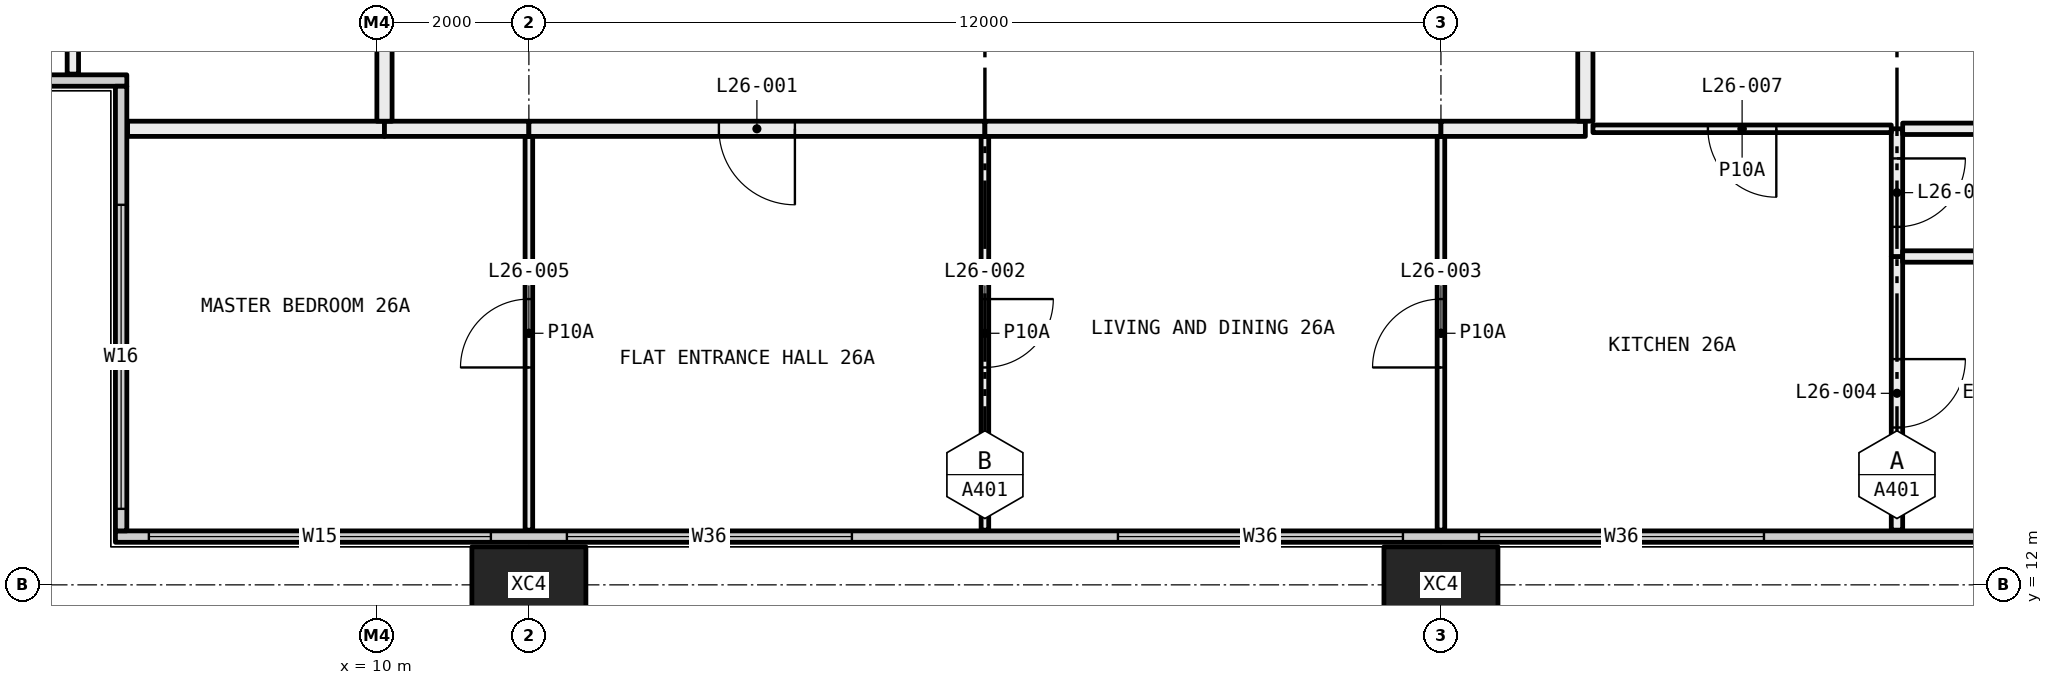
"""IFC4 building model, lengths in metres.
Left out: names, types, materials, properties, quantities, classifications, styles, units other than length and angle.
Written with IfcOpenShell. Run it as: python <this file> out.ifc"""

import sys

from ifc_helpers import new_model, si_unit, direction, frame, frame_2d, origin, origin_2d, place, context, subcontext, project, spatial, rectangle, hollow_rectangle, extrude, element, fill, save


model = new_model("IFC4")
c1 = context("Model", 3, precision=1e-05, world=origin(), true_north=direction((0.0, 1.0)))
c2 = subcontext(c1, "Body", "Model", "MODEL_VIEW")
j1 = project(units=[si_unit("LENGTHUNIT", "METRE"), si_unit("PLANEANGLEUNIT", "RADIAN")], contexts=[c1])
p1 = place(None, origin())
s1 = spatial("IfcSite", under=j1, at=p1, CompositionType="ELEMENT")
p2 = place(p1, origin())
s2 = spatial("IfcBuilding", under=s1, at=p2, CompositionType="ELEMENT")
p3 = place(p2, frame((0.0, 0.0, 103.5)))
s3 = spatial("IfcBuildingStorey", under=s2, at=p3, CompositionType="ELEMENT", Elevation=103.5)
for number, where, z_axis, x_axis in (
    (1, (12.0, 12.0, -0.4), (0.0, 0.0, 1.0), (1.0, 0.0, 0.0)),
    (2, (24.0, 12.0, -0.4), (0.0, 0.0, 1.0), (1.0, 0.0, 0.0)),
):
    element("IfcColumn", number, at=place(p3, frame(where, z_axis=z_axis, x_axis=x_axis)), inside=s3, PredefinedType="COLUMN", context=c2, shape_type="SweptSolid", body=[
        extrude(hollow_rectangle(XDim=1.5, YDim=1.0, WallThickness=0.06, at=origin_2d()), origin(), (0.0, 0.0, 1.0), 3.45),
    ])
p4 = place(p3, frame((6.56, 12.635, 0.0), z_axis=(0.0, 0.0, 1.0), x_axis=(1.0, 0.0, 0.0)))
e3 = element("IfcWall", 3, at=p4, inside=s3, PredefinedType="ELEMENTEDWALL", context=c2, shape_type="SweptSolid", body=[
    extrude(rectangle(XDim=58.88, YDim=0.15, at=frame_2d((29.44, 0.0))), origin(), (0.0, 0.0, 1.0), 3.05),
])
p5 = place(p4, frame((0.44, 0.0, 0.45)))
e4 = element("IfcOpeningElement", 4, at=p5, cuts=e3, PredefinedType="OPENING", context=c2, shape_type="SweptSolid", body=[
    extrude(rectangle(XDim=4.5, YDim=2.55, at=frame_2d((2.25, 1.275))), frame((0.0, 0.085, 0.0), z_axis=(0.0, -1.0, 0.0), x_axis=(1.0, 0.0, 0.0)), (0.0, 0.0, 1.0), 0.17),
])
p6 = place(p4, frame((5.94, 0.0, 0.45)))
e5 = element("IfcOpeningElement", 5, at=p6, cuts=e3, PredefinedType="OPENING", context=c2, shape_type="SweptSolid", body=[
    extrude(rectangle(XDim=3.75, YDim=2.55, at=frame_2d((1.875, 1.275))), frame((0.0, 0.085, 0.0), z_axis=(0.0, -1.0, 0.0), x_axis=(1.0, 0.0, 0.0)), (0.0, 0.0, 1.0), 0.17),
])
p7 = place(p4, frame((13.19, 0.0, 0.45)))
e6 = element("IfcOpeningElement", 6, at=p7, cuts=e3, PredefinedType="OPENING", context=c2, shape_type="SweptSolid", body=[
    extrude(rectangle(XDim=3.75, YDim=2.55, at=frame_2d((1.875, 1.275))), frame((0.0, 0.085, 0.0), z_axis=(0.0, -1.0, 0.0), x_axis=(1.0, 0.0, 0.0)), (0.0, 0.0, 1.0), 0.17),
])
p8 = place(p4, frame((17.94, 0.0, 0.45)))
e7 = element("IfcOpeningElement", 7, at=p8, cuts=e3, PredefinedType="OPENING", context=c2, shape_type="SweptSolid", body=[
    extrude(rectangle(XDim=3.75, YDim=2.55, at=frame_2d((1.875, 1.275))), frame((0.0, 0.085, 0.0), z_axis=(0.0, -1.0, 0.0), x_axis=(1.0, 0.0, 0.0)), (0.0, 0.0, 1.0), 0.17),
])
p9 = place(p4, frame((25.19, 0.0, 0.45)))
e8 = element("IfcOpeningElement", 8, at=p9, cuts=e3, PredefinedType="OPENING", context=c2, shape_type="SweptSolid", body=[
    extrude(rectangle(XDim=0.75, YDim=2.55, at=frame_2d((0.375, 1.275))), frame((0.0, 0.085, 0.0), z_axis=(0.0, -1.0, 0.0), x_axis=(1.0, 0.0, 0.0)), (0.0, 0.0, 1.0), 0.17),
])
p10 = place(p4, frame((26.94, 0.0, 0.45)))
e9 = element("IfcOpeningElement", 9, at=p10, cuts=e3, PredefinedType="OPENING", context=c2, shape_type="SweptSolid", body=[
    extrude(rectangle(XDim=2.0, YDim=2.55, at=frame_2d((1.0, 1.275))), frame((0.0, 0.085, 0.0), z_axis=(0.0, -1.0, 0.0), x_axis=(1.0, 0.0, 0.0)), (0.0, 0.0, 1.0), 0.17),
])
p11 = place(p4, frame((29.94, 0.0, 0.45)))
e10 = element("IfcOpeningElement", 10, at=p11, cuts=e3, PredefinedType="OPENING", context=c2, shape_type="SweptSolid", body=[
    extrude(rectangle(XDim=3.75, YDim=2.55, at=frame_2d((1.875, 1.275))), frame((0.0, 0.085, 0.0), z_axis=(0.0, -1.0, 0.0), x_axis=(1.0, 0.0, 0.0)), (0.0, 0.0, 1.0), 0.17),
])
p12 = place(p4, frame((37.19, 0.0, 0.45)))
e11 = element("IfcOpeningElement", 11, at=p12, cuts=e3, PredefinedType="OPENING", context=c2, shape_type="SweptSolid", body=[
    extrude(rectangle(XDim=3.75, YDim=2.55, at=frame_2d((1.875, 1.275))), frame((0.0, 0.085, 0.0), z_axis=(0.0, -1.0, 0.0), x_axis=(1.0, 0.0, 0.0)), (0.0, 0.0, 1.0), 0.17),
])
p13 = place(p4, frame((41.94, 0.0, 0.45)))
e12 = element("IfcOpeningElement", 12, at=p13, cuts=e3, PredefinedType="OPENING", context=c2, shape_type="SweptSolid", body=[
    extrude(rectangle(XDim=3.75, YDim=2.55, at=frame_2d((1.875, 1.275))), frame((0.0, 0.085, 0.0), z_axis=(0.0, -1.0, 0.0), x_axis=(1.0, 0.0, 0.0)), (0.0, 0.0, 1.0), 0.17),
])
p14 = place(p4, frame((49.19, 0.0, 0.45)))
e13 = element("IfcOpeningElement", 13, at=p14, cuts=e3, PredefinedType="OPENING", context=c2, shape_type="SweptSolid", body=[
    extrude(rectangle(XDim=0.75, YDim=2.55, at=frame_2d((0.375, 1.275))), frame((0.0, 0.085, 0.0), z_axis=(0.0, -1.0, 0.0), x_axis=(1.0, 0.0, 0.0)), (0.0, 0.0, 1.0), 0.17),
])
p15 = place(p4, frame((50.94, 0.0, 0.45)))
e14 = element("IfcOpeningElement", 14, at=p15, cuts=e3, PredefinedType="OPENING", context=c2, shape_type="SweptSolid", body=[
    extrude(rectangle(XDim=2.0, YDim=2.55, at=frame_2d((1.0, 1.275))), frame((0.0, 0.085, 0.0), z_axis=(0.0, -1.0, 0.0), x_axis=(1.0, 0.0, 0.0)), (0.0, 0.0, 1.0), 0.17),
])
p16 = place(p4, frame((53.94, 0.0, 0.45)))
e15 = element("IfcOpeningElement", 15, at=p16, cuts=e3, PredefinedType="OPENING", context=c2, shape_type="SweptSolid", body=[
    extrude(rectangle(XDim=4.5, YDim=2.55, at=frame_2d((2.25, 1.275))), frame((0.0, 0.085, 0.0), z_axis=(0.0, -1.0, 0.0), x_axis=(1.0, 0.0, 0.0)), (0.0, 0.0, 1.0), 0.17),
])
p17 = place(p3, frame((0.56, 18.635, 0.0), z_axis=(0.0, 0.0, 1.0), x_axis=(1.0, 0.0, 0.0)))
e16 = element("IfcWall", 16, at=p17, inside=s3, PredefinedType="ELEMENTEDWALL", context=c2, shape_type="SweptSolid", body=[
    extrude(rectangle(XDim=6.15, YDim=0.15, at=frame_2d((3.075, 0.0))), origin(), (0.0, 0.0, 1.0), 3.05),
])
p18 = place(p17, frame((0.44, 0.0, 0.45)))
e17 = element("IfcOpeningElement", 17, at=p18, cuts=e16, PredefinedType="OPENING", context=c2, shape_type="SweptSolid", body=[
    extrude(rectangle(XDim=4.0, YDim=2.55, at=frame_2d((2.0, 1.275))), frame((0.0, 0.085, 0.0), z_axis=(0.0, -1.0, 0.0), x_axis=(1.0, 0.0, 0.0)), (0.0, 0.0, 1.0), 0.17),
])
p19 = place(p3, frame((6.635, 12.71, 0.0), z_axis=(0.0, 0.0, 1.0), x_axis=(0.0, 1.0, 0.0)))
e18 = element("IfcWall", 18, at=p19, inside=s3, PredefinedType="ELEMENTEDWALL", context=c2, shape_type="SweptSolid", body=[
    extrude(rectangle(XDim=5.85, YDim=0.15, at=frame_2d((2.925, 0.0))), origin(), (0.0, 0.0, 1.0), 3.05),
])
p20 = place(p19, frame((0.29, 0.0, 0.45)))
e19 = element("IfcOpeningElement", 19, at=p20, cuts=e18, PredefinedType="OPENING", context=c2, shape_type="SweptSolid", body=[
    extrude(rectangle(XDim=4.0, YDim=2.55, at=frame_2d((2.0, 1.275))), frame((0.0, 0.085, 0.0), z_axis=(0.0, -1.0, 0.0), x_axis=(1.0, 0.0, 0.0)), (0.0, 0.0, 1.0), 0.17),
])
p21 = place(p3, frame((12.0, 12.72, 0.0), z_axis=(0.0, 0.0, 1.0), x_axis=(0.0, 1.0, 0.0)))
e20 = element("IfcWall", 20, at=p21, inside=s3, PredefinedType="PARTITIONING", context=c2, shape_type="SweptSolid", body=[
    extrude(rectangle(XDim=5.18, YDim=0.1, at=frame_2d((2.59, 0.0))), origin(), (0.0, 0.0, 1.0), 3.05),
])
p22 = place(p21, frame((2.14, 0.0, 0.0)))
e21 = element("IfcOpeningElement", 21, at=p22, cuts=e20, PredefinedType="OPENING", context=c2, shape_type="SweptSolid", body=[
    extrude(rectangle(XDim=0.9, YDim=2.1, at=frame_2d((0.45, 1.05))), frame((0.0, 0.06, 0.0), z_axis=(0.0, -1.0, 0.0), x_axis=(1.0, 0.0, 0.0)), (0.0, 0.0, 1.0), 0.12),
])
p23 = place(p3, frame((10.1, 18.0, 0.0), z_axis=(0.0, 0.0, 1.0), x_axis=(-1.0, 0.0, 0.0)))
e22 = element("IfcWall", 22, at=p23, inside=s3, PredefinedType="PARTITIONING", context=c2, shape_type="SweptSolid", body=[
    extrude(rectangle(XDim=3.38, YDim=0.2, at=frame_2d((1.69, 0.0))), origin(), (0.0, 0.0, 1.0), 3.05),
])
p24 = place(p3, frame((12.0, 18.0, 0.0), z_axis=(0.0, 0.0, 1.0), x_axis=(-1.0, 0.0, 0.0)))
e23 = element("IfcWall", 23, at=p24, inside=s3, PredefinedType="PARTITIONING", context=c2, shape_type="SweptSolid", body=[
    extrude(rectangle(XDim=1.9, YDim=0.2, at=frame_2d((0.95, 0.0))), origin(), (0.0, 0.0, 1.0), 3.05),
])
p25 = place(p3, frame((18.0, 12.72, 0.0), z_axis=(0.0, 0.0, 1.0), x_axis=(0.0, 1.0, 0.0)))
e24 = element("IfcWall", 24, at=p25, inside=s3, PredefinedType="PARTITIONING", context=c2, shape_type="SweptSolid", body=[
    extrude(rectangle(XDim=5.18, YDim=0.1, at=frame_2d((2.59, 0.0))), origin(), (0.0, 0.0, 1.0), 3.05),
])
p26 = place(p25, frame((2.14, 0.0, 0.0)))
e25 = element("IfcOpeningElement", 25, at=p26, cuts=e24, PredefinedType="OPENING", context=c2, shape_type="SweptSolid", body=[
    extrude(rectangle(XDim=0.9, YDim=2.1, at=frame_2d((0.45, 1.05))), frame((0.0, 0.06, 0.0), z_axis=(0.0, -1.0, 0.0), x_axis=(1.0, 0.0, 0.0)), (0.0, 0.0, 1.0), 0.12),
])
p27 = place(p3, frame((18.0, 18.0, 0.0), z_axis=(0.0, 0.0, 1.0), x_axis=(-1.0, 0.0, 0.0)))
e26 = element("IfcWall", 26, at=p27, inside=s3, PredefinedType="PARTITIONING", context=c2, shape_type="SweptSolid", body=[
    extrude(rectangle(XDim=6.0, YDim=0.2, at=frame_2d((3.0, 0.0))), origin(), (0.0, 0.0, 1.0), 3.05),
])
p28 = place(p27, frame((2.5, 0.0, 0.0)))
e27 = element("IfcOpeningElement", 27, at=p28, cuts=e26, PredefinedType="OPENING", context=c2, shape_type="SweptSolid", body=[
    extrude(rectangle(XDim=1.0, YDim=2.1, at=frame_2d((0.5, 1.05))), frame((0.0, 0.11, 0.0), z_axis=(0.0, -1.0, 0.0), x_axis=(1.0, 0.0, 0.0)), (0.0, 0.0, 1.0), 0.22),
])
p29 = place(p3, frame((24.0, 12.72, 0.0), z_axis=(0.0, 0.0, 1.0), x_axis=(0.0, 1.0, 0.0)))
e28 = element("IfcWall", 28, at=p29, inside=s3, PredefinedType="PARTITIONING", context=c2, shape_type="SweptSolid", body=[
    extrude(rectangle(XDim=5.18, YDim=0.1, at=frame_2d((2.59, 0.0))), origin(), (0.0, 0.0, 1.0), 3.05),
])
p30 = place(p29, frame((2.14, 0.0, 0.0)))
e29 = element("IfcOpeningElement", 29, at=p30, cuts=e28, PredefinedType="OPENING", context=c2, shape_type="SweptSolid", body=[
    extrude(rectangle(XDim=0.9, YDim=2.1, at=frame_2d((0.45, 1.05))), frame((0.0, 0.06, 0.0), z_axis=(0.0, -1.0, 0.0), x_axis=(1.0, 0.0, 0.0)), (0.0, 0.0, 1.0), 0.12),
])
p31 = place(p3, frame((24.0, 18.0, 0.0), z_axis=(0.0, 0.0, 1.0), x_axis=(-1.0, 0.0, 0.0)))
e30 = element("IfcWall", 30, at=p31, inside=s3, PredefinedType="PARTITIONING", context=c2, shape_type="SweptSolid", body=[
    extrude(rectangle(XDim=6.0, YDim=0.2, at=frame_2d((3.0, 0.0))), origin(), (0.0, 0.0, 1.0), 3.05),
])
p32 = place(p3, frame((30.0, 12.72, 0.0), z_axis=(0.0, 0.0, 1.0), x_axis=(0.0, 1.0, 0.0)))
e31 = element("IfcWall", 31, at=p32, inside=s3, PredefinedType="PARTITIONING", context=c2, shape_type="SweptSolid", body=[
    extrude(rectangle(XDim=3.6, YDim=0.15, at=frame_2d((1.8, 0.0))), origin(), (0.0, 0.0, 1.0), 3.05),
])
p33 = place(p32, frame((1.35, 0.0, 0.0)))
e32 = element("IfcOpeningElement", 32, at=p33, cuts=e31, PredefinedType="OPENING", context=c2, shape_type="SweptSolid", body=[
    extrude(rectangle(XDim=0.9, YDim=2.1, at=frame_2d((0.45, 1.05))), frame((0.0, 0.085, 0.0), z_axis=(0.0, -1.0, 0.0), x_axis=(1.0, 0.0, 0.0)), (0.0, 0.0, 1.0), 0.17),
])
p34 = place(p3, frame((30.0, 16.32, 0.0), z_axis=(0.0, 0.0, 1.0), x_axis=(0.0, 1.0, 0.0)))
e33 = element("IfcWall", 33, at=p34, inside=s3, PredefinedType="PARTITIONING", context=c2, shape_type="SweptSolid", body=[
    extrude(rectangle(XDim=1.68, YDim=0.15, at=frame_2d((0.84, 0.0))), origin(), (0.0, 0.0, 1.0), 3.05),
])
p35 = place(p34, frame((0.39, 0.0, 0.0)))
e34 = element("IfcOpeningElement", 34, at=p35, cuts=e33, PredefinedType="OPENING", context=c2, shape_type="SweptSolid", body=[
    extrude(rectangle(XDim=0.9, YDim=2.1, at=frame_2d((0.45, 1.05))), frame((0.0, 0.085, 0.0), z_axis=(0.0, -1.0, 0.0), x_axis=(1.0, 0.0, 0.0)), (0.0, 0.0, 1.0), 0.17),
])
p36 = place(p3, frame((29.925, 18.0, 0.0), z_axis=(0.0, 0.0, 1.0), x_axis=(-1.0, 0.0, 0.0)))
e35 = element("IfcWall", 35, at=p36, inside=s3, PredefinedType="PARTITIONING", context=c2, shape_type="SweptSolid", body=[
    extrude(rectangle(XDim=3.925, YDim=0.1, at=frame_2d((1.962, 0.0))), origin(), (0.0, 0.0, 1.0), 3.05),
])
p37 = place(p36, frame((1.512, 0.0, 0.0)))
e36 = element("IfcOpeningElement", 36, at=p37, cuts=e35, PredefinedType="OPENING", context=c2, shape_type="SweptSolid", body=[
    extrude(rectangle(XDim=0.9, YDim=2.1, at=frame_2d((0.45, 1.05))), frame((0.0, 0.06, 0.0), z_axis=(0.0, -1.0, 0.0), x_axis=(1.0, 0.0, 0.0)), (0.0, 0.0, 1.0), 0.12),
])
p38 = place(p3, frame((25.9, 18.0, 0.0), z_axis=(0.0, 0.0, 1.0), x_axis=(-1.0, 0.0, 0.0)))
e37 = element("IfcWall", 37, at=p38, inside=s3, PredefinedType="PARTITIONING", context=c2, shape_type="SweptSolid", body=[
    extrude(rectangle(XDim=1.9, YDim=0.2, at=frame_2d((0.95, 0.0))), origin(), (0.0, 0.0, 1.0), 3.05),
])
p39 = place(p3, frame((35.9, 16.32, 0.0), z_axis=(0.0, 0.0, 1.0), x_axis=(-1.0, 0.0, 0.0)))
e38 = element("IfcWall", 38, at=p39, inside=s3, PredefinedType="PARTITIONING", context=c2, shape_type="SweptSolid", body=[
    extrude(rectangle(XDim=5.825, YDim=0.15, at=frame_2d((2.913, 0.0))), origin(), (0.0, 0.0, 1.0), 3.05),
])
p40 = place(p3, frame((31.5, 18.0, 0.0), z_axis=(0.0, 0.0, 1.0), x_axis=(-1.0, 0.0, 0.0)))
e39 = element("IfcWall", 39, at=p40, inside=s3, PredefinedType="PARTITIONING", context=c2, shape_type="SweptSolid", body=[
    extrude(rectangle(XDim=1.425, YDim=0.15, at=frame_2d((0.712, 0.0))), origin(), (0.0, 0.0, 1.0), 3.05),
])
p41 = place(p3, frame((25.9, 23.9, 0.0), z_axis=(0.0, 0.0, 1.0), x_axis=(0.0, -1.0, 0.0)))
e40 = element("IfcWall", 40, at=p41, inside=s3, PredefinedType="PARTITIONING", context=c2, shape_type="SweptSolid", body=[
    extrude(rectangle(XDim=5.8, YDim=0.2, at=frame_2d((2.9, 0.0))), origin(), (0.0, 0.0, 1.0), 3.05),
])
p42 = place(p3, frame((6.0, 18.72, 0.0), z_axis=(0.0, 0.0, 1.0), x_axis=(0.0, 1.0, 0.0)))
e41 = element("IfcWall", 41, at=p42, inside=s3, PredefinedType="PARTITIONING", context=c2, shape_type="SweptSolid", body=[
    extrude(rectangle(XDim=3.78, YDim=0.15, at=frame_2d((1.89, 0.0))), origin(), (0.0, 0.0, 1.0), 3.05),
])
p43 = place(p3, frame((10.1, 18.1, 0.0), z_axis=(0.0, 0.0, 1.0), x_axis=(0.0, 1.0, 0.0)))
e42 = element("IfcWall", 42, at=p43, inside=s3, PredefinedType="PARTITIONING", context=c2, shape_type="SweptSolid", body=[
    extrude(rectangle(XDim=4.4, YDim=0.2, at=frame_2d((2.2, 0.0))), origin(), (0.0, 0.0, 1.0), 3.05),
])
p44 = place(p5, origin())
e43 = element("IfcWindow", 43, at=p44, inside=s3, PartitioningType="SINGLE_PANEL", PredefinedType="WINDOW", context=c2, shape_type="SweptSolid", body=[
    extrude(rectangle(XDim=4.5, YDim=2.55, at=frame_2d((2.25, 1.275))), frame((0.0, 0.03, 0.0), z_axis=(0.0, -1.0, 0.0), x_axis=(1.0, 0.0, 0.0)), (0.0, 0.0, 1.0), 0.06),
])
fill(e4, e43)
p45 = place(p6, origin())
e44 = element("IfcWindow", 44, at=p45, inside=s3, PartitioningType="SINGLE_PANEL", PredefinedType="WINDOW", context=c2, shape_type="SweptSolid", body=[
    extrude(rectangle(XDim=3.75, YDim=2.55, at=frame_2d((1.875, 1.275))), frame((0.0, 0.03, 0.0), z_axis=(0.0, -1.0, 0.0), x_axis=(1.0, 0.0, 0.0)), (0.0, 0.0, 1.0), 0.06),
])
fill(e5, e44)
p46 = place(p7, origin())
e45 = element("IfcWindow", 45, at=p46, inside=s3, PartitioningType="SINGLE_PANEL", PredefinedType="WINDOW", context=c2, shape_type="SweptSolid", body=[
    extrude(rectangle(XDim=3.75, YDim=2.55, at=frame_2d((1.875, 1.275))), frame((0.0, 0.03, 0.0), z_axis=(0.0, -1.0, 0.0), x_axis=(1.0, 0.0, 0.0)), (0.0, 0.0, 1.0), 0.06),
])
fill(e6, e45)
p47 = place(p8, origin())
e46 = element("IfcWindow", 46, at=p47, inside=s3, PartitioningType="SINGLE_PANEL", PredefinedType="WINDOW", context=c2, shape_type="SweptSolid", body=[
    extrude(rectangle(XDim=3.75, YDim=2.55, at=frame_2d((1.875, 1.275))), frame((0.0, 0.03, 0.0), z_axis=(0.0, -1.0, 0.0), x_axis=(1.0, 0.0, 0.0)), (0.0, 0.0, 1.0), 0.06),
])
fill(e7, e46)
p48 = place(p20, origin())
e47 = element("IfcWindow", 47, at=p48, inside=s3, PartitioningType="SINGLE_PANEL", PredefinedType="WINDOW", context=c2, shape_type="SweptSolid", body=[
    extrude(rectangle(XDim=4.0, YDim=2.55, at=frame_2d((2.0, 1.275))), frame((0.0, 0.03, 0.0), z_axis=(0.0, -1.0, 0.0), x_axis=(1.0, 0.0, 0.0)), (0.0, 0.0, 1.0), 0.06),
])
fill(e19, e47)
p49 = place(p28, origin())
e48 = element("IfcDoor", 48, at=p49, inside=s3, OperationType="SINGLE_SWING_RIGHT", PredefinedType="DOOR", context=c2, shape_type="SweptSolid", body=[
    extrude(rectangle(XDim=1.0, YDim=2.1, at=frame_2d((0.5, 1.05))), frame((0.0, 0.025, 0.0), z_axis=(0.0, -1.0, 0.0), x_axis=(1.0, 0.0, 0.0)), (0.0, 0.0, 1.0), 0.05),
])
fill(e27, e48)
p50 = place(p26, frame((0.9, 0.0, 0.0), x_axis=(-1.0, 0.0, 0.0)))
e49 = element("IfcDoor", 49, at=p50, inside=s3, OperationType="SINGLE_SWING_RIGHT", PredefinedType="DOOR", context=c2, shape_type="SweptSolid", body=[
    extrude(rectangle(XDim=0.9, YDim=2.1, at=frame_2d((0.45, 1.05))), frame((0.0, 0.025, 0.0), z_axis=(0.0, -1.0, 0.0), x_axis=(1.0, 0.0, 0.0)), (0.0, 0.0, 1.0), 0.05),
])
fill(e25, e49)
p51 = place(p30, origin())
e50 = element("IfcDoor", 50, at=p51, inside=s3, OperationType="SINGLE_SWING_RIGHT", PredefinedType="DOOR", context=c2, shape_type="SweptSolid", body=[
    extrude(rectangle(XDim=0.9, YDim=2.1, at=frame_2d((0.45, 1.05))), frame((0.0, 0.025, 0.0), z_axis=(0.0, -1.0, 0.0), x_axis=(1.0, 0.0, 0.0)), (0.0, 0.0, 1.0), 0.05),
])
fill(e29, e50)
p52 = place(p33, frame((0.9, 0.0, 0.0), x_axis=(-1.0, 0.0, 0.0)))
e51 = element("IfcDoor", 51, at=p52, inside=s3, OperationType="SINGLE_SWING_RIGHT", PredefinedType="DOOR", context=c2, shape_type="SweptSolid", body=[
    extrude(rectangle(XDim=0.9, YDim=2.1, at=frame_2d((0.45, 1.05))), frame((0.0, 0.025, 0.0), z_axis=(0.0, -1.0, 0.0), x_axis=(1.0, 0.0, 0.0)), (0.0, 0.0, 1.0), 0.05),
])
fill(e32, e51)
p53 = place(p22, origin())
e52 = element("IfcDoor", 52, at=p53, inside=s3, OperationType="SINGLE_SWING_RIGHT", PredefinedType="DOOR", context=c2, shape_type="SweptSolid", body=[
    extrude(rectangle(XDim=0.9, YDim=2.1, at=frame_2d((0.45, 1.05))), frame((0.0, 0.025, 0.0), z_axis=(0.0, -1.0, 0.0), x_axis=(1.0, 0.0, 0.0)), (0.0, 0.0, 1.0), 0.05),
])
fill(e21, e52)
p54 = place(p35, frame((0.9, 0.0, 0.0), x_axis=(-1.0, 0.0, 0.0)))
e53 = element("IfcDoor", 53, at=p54, inside=s3, OperationType="SINGLE_SWING_RIGHT", PredefinedType="DOOR", context=c2, shape_type="SweptSolid", body=[
    extrude(rectangle(XDim=0.9, YDim=2.1, at=frame_2d((0.45, 1.05))), frame((0.0, 0.025, 0.0), z_axis=(0.0, -1.0, 0.0), x_axis=(1.0, 0.0, 0.0)), (0.0, 0.0, 1.0), 0.05),
])
fill(e34, e53)
p55 = place(p37, origin())
e54 = element("IfcDoor", 54, at=p55, inside=s3, OperationType="SINGLE_SWING_RIGHT", PredefinedType="DOOR", context=c2, shape_type="SweptSolid", body=[
    extrude(rectangle(XDim=0.9, YDim=2.1, at=frame_2d((0.45, 1.05))), frame((0.0, 0.025, 0.0), z_axis=(0.0, -1.0, 0.0), x_axis=(1.0, 0.0, 0.0)), (0.0, 0.0, 1.0), 0.05),
])
fill(e36, e54)
save(model, sys.argv[1])
